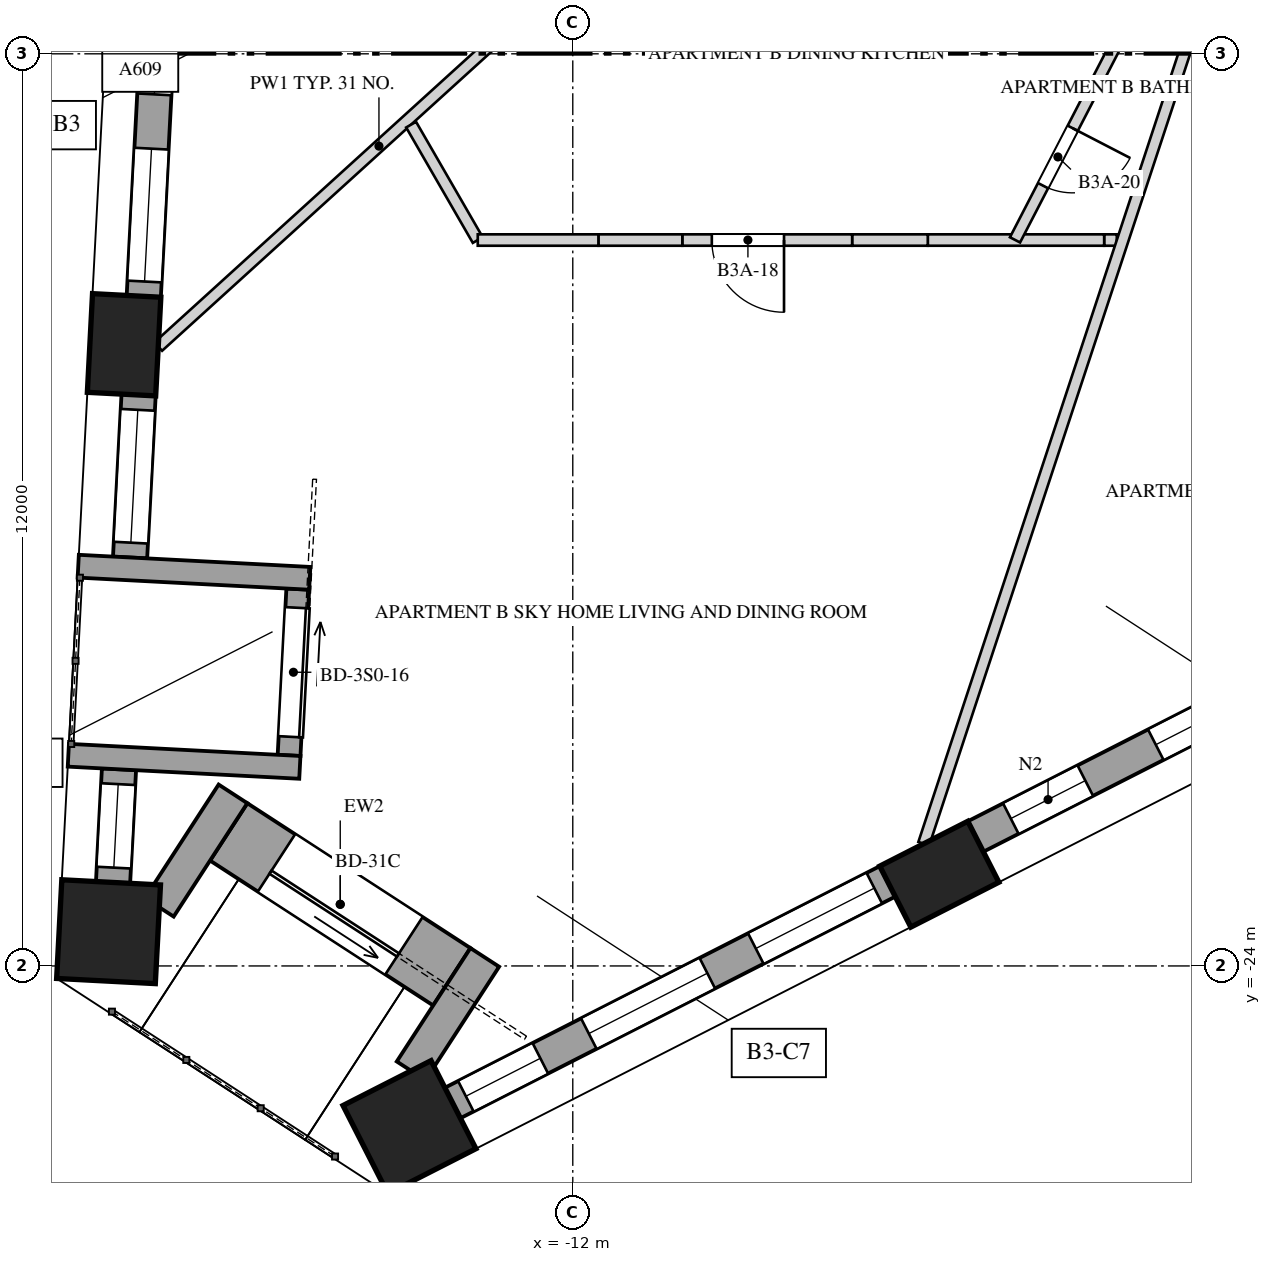
"""IFC4 building model, lengths in metres.
Left out: names, types, materials, properties, quantities, classifications, styles, units other than length and angle.
Written with IfcOpenShell. Run it as: python <this file> out.ifc"""

import sys

from ifc_helpers import new_model, si_unit, direction, frame, frame_2d, origin, origin_2d, place, context, subcontext, project, spatial, rectangle, extrude, element, fill, save


model = new_model("IFC4")
c1 = context("Model", 3, precision=1e-05, world=origin(), true_north=direction((0.0, 1.0)))
c2 = subcontext(c1, "Body", "Model", "MODEL_VIEW")
j1 = project(units=[si_unit("LENGTHUNIT", "METRE"), si_unit("PLANEANGLEUNIT", "RADIAN")], contexts=[c1])
p1 = place(None, origin())
s1 = spatial("IfcSite", under=j1, at=p1, CompositionType="ELEMENT")
p2 = place(p1, origin())
s2 = spatial("IfcBuilding", under=s1, at=p2, CompositionType="ELEMENT")
p3 = place(p2, frame((0.0, 0.0, 129.6)))
s3 = spatial("IfcBuildingStorey", under=s2, at=p3, CompositionType="ELEMENT", Elevation=129.6)
p4 = place(p3, frame((-17.903, -15.828, 0.0), z_axis=(0.0, 0.0, 1.0), x_axis=(-0.052335956243, -0.998629534755, 0.0)))
e1 = element("IfcColumn", 1, at=p4, inside=s3, PredefinedType="COLUMN", context=c2, shape_type="SweptSolid", body=[
    extrude(rectangle(XDim=1.3, YDim=0.9, at=origin_2d()), origin(), (0.0, 0.0, 1.0), 4.0),
])
for number, where, z_axis, x_axis in (
    (2, (-18.107, -23.549, 0.0), (0.0, 0.0, 1.0), (-0.052, -0.999, 0.0)),
    (3, (-14.148, -26.12, 0.0), (0.0, 0.0, 1.0), (0.891, 0.454, 0.0)),
):
    element("IfcColumn", number, at=place(p3, frame(where, z_axis=z_axis, x_axis=x_axis)), inside=s3, PredefinedType="COLUMN", context=c2, shape_type="SweptSolid", body=[
        extrude(rectangle(XDim=1.3, YDim=1.3, at=origin_2d()), origin(), (0.0, 0.0, 1.0), 4.0),
    ])
p5 = place(p3, frame((-7.178, -22.793, 0.0), z_axis=(0.0, 0.0, 1.0), x_axis=(0.891006524188, 0.45399049974, 0.0)))
e4 = element("IfcColumn", 4, at=p5, inside=s3, PredefinedType="COLUMN", context=c2, shape_type="SweptSolid", body=[
    extrude(rectangle(XDim=1.3, YDim=0.9, at=origin_2d()), origin(), (0.0, 0.0, 1.0), 4.0),
])
p6 = place(p3, frame((-17.274, -8.129, 0.0), z_axis=(0.0, 0.0, 1.0), x_axis=(-0.052339570873, -0.998629345313, 0.0)))
e5 = element("IfcWall", 5, at=p6, inside=s3, PredefinedType="SOLIDWALL", context=c2, shape_type="SweptSolid", body=[
    extrude(rectangle(XDim=7.072, YDim=0.45, at=frame_2d((3.536, 0.0))), origin(), (0.0, 0.0, 1.0), 3.3),
])
p7 = place(p6, frame((0.195, 0.0, 0.5)))
e6 = element("IfcOpeningElement", 6, at=p7, cuts=e5, PredefinedType="OPENING", context=c2, shape_type="SweptSolid", body=[
    extrude(rectangle(XDim=1.75, YDim=2.65, at=frame_2d((0.875, 1.325))), frame((0.0, 0.235, 0.0), z_axis=(0.0, -1.0, 0.0), x_axis=(1.0, 0.0, 0.0)), (0.0, 0.0, 1.0), 0.47),
])
p8 = place(p6, frame((2.661, 0.0, 0.5)))
e7 = element("IfcOpeningElement", 7, at=p8, cuts=e5, PredefinedType="OPENING", context=c2, shape_type="SweptSolid", body=[
    extrude(rectangle(XDim=1.75, YDim=2.65, at=frame_2d((0.875, 1.325))), frame((0.0, 0.235, 0.0), z_axis=(0.0, -1.0, 0.0), x_axis=(1.0, 0.0, 0.0)), (0.0, 0.0, 1.0), 0.47),
])
p9 = place(p6, frame((5.126, 0.0, 0.5)))
e8 = element("IfcOpeningElement", 8, at=p9, cuts=e5, PredefinedType="OPENING", context=c2, shape_type="SweptSolid", body=[
    extrude(rectangle(XDim=1.75, YDim=2.0, at=frame_2d((0.875, 1.0))), frame((0.0, 0.235, 0.0), z_axis=(0.0, -1.0, 0.0), x_axis=(1.0, 0.0, 0.0)), (0.0, 0.0, 1.0), 0.47),
])
p10 = place(p3, frame((-17.712, -16.489, 0.0), z_axis=(0.0, 0.0, 1.0), x_axis=(-0.05234931875, -0.998628834366, 0.0)))
e9 = element("IfcWall", 9, at=p10, inside=s3, PredefinedType="SOLIDWALL", context=c2, shape_type="SweptSolid", body=[
    extrude(rectangle(XDim=2.141, YDim=0.45, at=frame_2d((1.07, 0.0))), origin(), (0.0, 0.0, 1.0), 3.3),
])
p11 = place(p10, frame((0.195, 0.0, 0.5)))
e10 = element("IfcOpeningElement", 10, at=p11, cuts=e9, PredefinedType="OPENING", context=c2, shape_type="SweptSolid", body=[
    extrude(rectangle(XDim=1.75, YDim=2.65, at=frame_2d((0.875, 1.325))), frame((0.0, 0.235, 0.0), z_axis=(0.0, -1.0, 0.0), x_axis=(1.0, 0.0, 0.0)), (0.0, 0.0, 1.0), 0.47),
])
p12 = place(p3, frame((-17.97, -21.413, 0.0), z_axis=(0.0, 0.0, 1.0), x_axis=(-0.052412688754, -0.998625510418, 0.0)))
e11 = element("IfcWall", 11, at=p12, inside=s3, PredefinedType="SOLIDWALL", context=c2, shape_type="SweptSolid", body=[
    extrude(rectangle(XDim=1.49, YDim=0.45, at=frame_2d((0.745, 0.0))), origin(), (0.0, 0.0, 1.0), 3.3),
])
p13 = place(p12, frame((0.195, 0.0, 0.5)))
e12 = element("IfcOpeningElement", 12, at=p13, cuts=e11, PredefinedType="OPENING", context=c2, shape_type="SweptSolid", body=[
    extrude(rectangle(XDim=1.1, YDim=2.0, at=frame_2d((0.55, 1.0))), frame((0.0, 0.235, 0.0), z_axis=(0.0, -1.0, 0.0), x_axis=(1.0, 0.0, 0.0)), (0.0, 0.0, 1.0), 0.47),
])
p14 = place(p3, frame((-13.581, -25.803, 0.0), z_axis=(0.0, 0.0, 1.0), x_axis=(0.891010191031, 0.453983303085, 0.0)))
e13 = element("IfcWall", 13, at=p14, inside=s3, PredefinedType="SOLIDWALL", context=c2, shape_type="SweptSolid", body=[
    extrude(rectangle(XDim=6.422, YDim=0.45, at=frame_2d((3.211, 0.0))), origin(), (0.0, 0.0, 1.0), 3.3),
])
p15 = place(p14, frame((0.195, 0.0, 0.5)))
e14 = element("IfcOpeningElement", 14, at=p15, cuts=e13, PredefinedType="OPENING", context=c2, shape_type="SweptSolid", body=[
    extrude(rectangle(XDim=1.1, YDim=2.0, at=frame_2d((0.55, 1.0))), frame((0.0, 0.235, 0.0), z_axis=(0.0, -1.0, 0.0), x_axis=(1.0, 0.0, 0.0)), (0.0, 0.0, 1.0), 0.47),
])
p16 = place(p14, frame((2.011, 0.0, 0.5)))
e15 = element("IfcOpeningElement", 15, at=p16, cuts=e13, PredefinedType="OPENING", context=c2, shape_type="SweptSolid", body=[
    extrude(rectangle(XDim=1.75, YDim=2.65, at=frame_2d((0.875, 1.325))), frame((0.0, 0.235, 0.0), z_axis=(0.0, -1.0, 0.0), x_axis=(1.0, 0.0, 0.0)), (0.0, 0.0, 1.0), 0.47),
])
p17 = place(p14, frame((4.476, 0.0, 0.5)))
e16 = element("IfcOpeningElement", 16, at=p17, cuts=e13, PredefinedType="OPENING", context=c2, shape_type="SweptSolid", body=[
    extrude(rectangle(XDim=1.75, YDim=2.65, at=frame_2d((0.875, 1.325))), frame((0.0, 0.235, 0.0), z_axis=(0.0, -1.0, 0.0), x_axis=(1.0, 0.0, 0.0)), (0.0, 0.0, 1.0), 0.47),
])
p18 = place(p3, frame((-6.701, -22.297, 0.0), z_axis=(0.0, 0.0, 1.0), x_axis=(0.891004189171, 0.45399508244, 0.0)))
e17 = element("IfcWall", 17, at=p18, inside=s3, PredefinedType="SOLIDWALL", context=c2, shape_type="SweptSolid", body=[
    extrude(rectangle(XDim=7.072, YDim=0.45, at=frame_2d((3.536, 0.0))), origin(), (0.0, 0.0, 1.0), 3.3),
])
p19 = place(p18, frame((0.52, 0.0, 0.5)))
e18 = element("IfcOpeningElement", 18, at=p19, cuts=e17, PredefinedType="OPENING", context=c2, shape_type="SweptSolid", body=[
    extrude(rectangle(XDim=1.1, YDim=2.65, at=frame_2d((0.55, 1.325))), frame((0.0, 0.235, 0.0), z_axis=(0.0, -1.0, 0.0), x_axis=(1.0, 0.0, 0.0)), (0.0, 0.0, 1.0), 0.47),
])
p20 = place(p18, frame((2.661, 0.0, 0.5)))
e19 = element("IfcOpeningElement", 19, at=p20, cuts=e17, PredefinedType="OPENING", context=c2, shape_type="SweptSolid", body=[
    extrude(rectangle(XDim=1.75, YDim=2.65, at=frame_2d((0.875, 1.325))), frame((0.0, 0.235, 0.0), z_axis=(0.0, -1.0, 0.0), x_axis=(1.0, 0.0, 0.0)), (0.0, 0.0, 1.0), 0.47),
])
p21 = place(p18, frame((5.126, 0.0, 0.5)))
e20 = element("IfcOpeningElement", 20, at=p21, cuts=e17, PredefinedType="OPENING", context=c2, shape_type="SweptSolid", body=[
    extrude(rectangle(XDim=1.75, YDim=2.65, at=frame_2d((0.875, 1.325))), frame((0.0, 0.235, 0.0), z_axis=(0.0, -1.0, 0.0), x_axis=(1.0, 0.0, 0.0)), (0.0, 0.0, 1.0), 0.47),
])
p22 = place(p3, frame((-15.618, -19.042, 0.0), z_axis=(0.0, 0.0, 1.0), x_axis=(-0.052383338583, -0.998627050424, 0.0)))
e21 = element("IfcWall", 21, at=p22, inside=s3, PredefinedType="SOLIDWALL", context=c2, shape_type="SweptSolid", body=[
    extrude(rectangle(XDim=2.19, YDim=0.3, at=frame_2d((1.095, 0.0))), origin(), (0.0, 0.0, 1.0), 3.3),
])
p23 = place(p22, frame((0.245, 0.0, 0.0)))
e22 = element("IfcOpeningElement", 22, at=p23, cuts=e21, PredefinedType="OPENING", context=c2, shape_type="SweptSolid", body=[
    extrude(rectangle(XDim=1.7, YDim=2.45, at=frame_2d((0.85, 1.225))), frame((0.0, 0.16, 0.0), z_axis=(0.0, -1.0, 0.0), x_axis=(1.0, 0.0, 0.0)), (0.0, 0.0, 1.0), 0.32),
])
for number, where, z_axis, x_axis in (
    (23, (-18.506, -18.741, 0.0), (0.0, 0.0, 1.0), (0.999, -0.052, 0.0)),
    (24, (-18.636, -21.228, 0.0), (0.0, 0.0, 1.0), (0.999, -0.052, 0.0)),
):
    element("IfcWall", number, at=place(p3, frame(where, z_axis=z_axis, x_axis=x_axis)), inside=s3, PredefinedType="SOLIDWALL", context=c2, shape_type="SweptSolid", body=[
        extrude(rectangle(XDim=3.05, YDim=0.3, at=frame_2d((1.525, 0.0))), origin(), (0.0, 0.0, 1.0), 3.3),
    ])
p24 = place(p3, frame((-13.592, -24.142, 0.0), z_axis=(0.0, 0.0, 1.0), x_axis=(-0.838665071449, 0.544647498784, 0.0)))
e25 = element("IfcWall", 25, at=p24, inside=s3, PredefinedType="SOLIDWALL", context=c2, shape_type="SweptSolid", body=[
    extrude(rectangle(XDim=3.5, YDim=0.9, at=frame_2d((1.75, 0.0))), origin(), (0.0, 0.0, 1.0), 3.3),
])
p25 = place(p24, frame((0.75, 0.0, 0.0)))
e26 = element("IfcOpeningElement", 26, at=p25, cuts=e25, PredefinedType="OPENING", context=c2, shape_type="SweptSolid", body=[
    extrude(rectangle(XDim=2.0, YDim=2.4, at=frame_2d((1.0, 1.2))), frame((0.0, 0.46, 0.0), z_axis=(0.0, -1.0, 0.0), x_axis=(1.0, 0.0, 0.0)), (0.0, 0.0, 1.0), 0.92),
])
for number, where, z_axis, x_axis in (
    (27, (-14.127, -25.38, 0.0), (0.0, 0.0, 1.0), (0.545, 0.839, 0.0)),
    (28, (-17.44, -23.228, 0.0), (0.0, 0.0, 1.0), (0.545, 0.839, 0.0)),
):
    element("IfcWall", number, at=place(p3, frame(where, z_axis=z_axis, x_axis=x_axis)), inside=s3, PredefinedType="SOLIDWALL", context=c2, shape_type="SweptSolid", body=[
        extrude(rectangle(XDim=1.779, YDim=0.45, at=frame_2d((0.89, 0.0))), origin(), (0.0, 0.0, 1.0), 2.55),
    ])
p26 = place(p3, frame((-17.454, -15.851, 0.0), z_axis=(0.0, 0.0, 1.0), x_axis=(0.740276567096, 0.672302464824, 0.0)))
e29 = element("IfcWall", 29, at=p26, inside=s3, PredefinedType="PARTITIONING", context=c2, shape_type="SweptSolid", body=[
    extrude(rectangle(XDim=7.844, YDim=0.15, at=frame_2d((3.922, 0.0))), origin(), (0.0, 0.0, 1.0), 2.75),
])
p27 = place(p3, frame((-13.25, -14.45, 0.0), z_axis=(0.0, 0.0, 1.0), x_axis=(-0.500047902311, 0.865997745606, 0.0)))
e30 = element("IfcWall", 30, at=p27, inside=s3, PredefinedType="PARTITIONING", context=c2, shape_type="SweptSolid", body=[
    extrude(rectangle(XDim=1.753, YDim=0.15, at=frame_2d((0.876, 0.0))), origin(), (0.0, 0.0, 1.0), 3.65),
])
p28 = place(p3, frame((-4.843, -14.45, 0.0), z_axis=(0.0, 0.0, 1.0), x_axis=(-1.0, 0.0, 0.0)))
e31 = element("IfcWall", 31, at=p28, inside=s3, PredefinedType="PARTITIONING", context=c2, shape_type="SweptSolid", body=[
    extrude(rectangle(XDim=0.166, YDim=0.15, at=frame_2d((0.083, 0.0))), origin(), (0.0, 0.0, 1.0), 2.55),
])
p29 = place(p3, frame((-5.009, -14.45, 0.0), z_axis=(0.0, 0.0, 1.0), x_axis=(-1.0, 0.0, 0.0)))
e32 = element("IfcWall", 32, at=p29, inside=s3, PredefinedType="PARTITIONING", context=c2, shape_type="SweptSolid", body=[
    extrude(rectangle(XDim=2.321, YDim=0.15, at=frame_2d((1.16, 0.0))), origin(), (0.0, 0.0, 1.0), 3.65),
])
p30 = place(p3, frame((-7.33, -14.45, 0.0), z_axis=(0.0, 0.0, 1.0), x_axis=(-1.0, 0.0, 0.0)))
e33 = element("IfcWall", 33, at=p30, inside=s3, PredefinedType="PARTITIONING", context=c2, shape_type="SweptSolid", body=[
    extrude(rectangle(XDim=0.995, YDim=0.15, at=frame_2d((0.498, 0.0))), origin(), (0.0, 0.0, 1.0), 2.55),
])
p31 = place(p3, frame((-8.325, -14.45, 0.0), z_axis=(0.0, 0.0, 1.0), x_axis=(-1.0, 0.0, 0.0)))
e34 = element("IfcWall", 34, at=p31, inside=s3, PredefinedType="PARTITIONING", context=c2, shape_type="SweptSolid", body=[
    extrude(rectangle(XDim=2.234, YDim=0.15, at=frame_2d((1.117, 0.0))), origin(), (0.0, 0.0, 1.0), 3.65),
])
p32 = place(p31, frame((0.896, 0.0, 0.0)))
e35 = element("IfcOpeningElement", 35, at=p32, cuts=e34, PredefinedType="OPENING", context=c2, shape_type="SweptSolid", body=[
    extrude(rectangle(XDim=0.95, YDim=2.4, at=frame_2d((0.475, 1.2))), frame((0.0, 0.085, 0.0), z_axis=(0.0, -1.0, 0.0), x_axis=(1.0, 0.0, 0.0)), (0.0, 0.0, 1.0), 0.17),
])
p33 = place(p3, frame((-10.559, -14.45, 0.0), z_axis=(0.0, 0.0, 1.0), x_axis=(-1.0, 0.0, 0.0)))
e36 = element("IfcWall", 36, at=p33, inside=s3, PredefinedType="PARTITIONING", context=c2, shape_type="SweptSolid", body=[
    extrude(rectangle(XDim=1.104, YDim=0.15, at=frame_2d((0.552, 0.0))), origin(), (0.0, 0.0, 1.0), 2.55),
])
p34 = place(p3, frame((-11.663, -14.45, 0.0), z_axis=(0.0, 0.0, 1.0), x_axis=(-1.0, 0.0, 0.0)))
e37 = element("IfcWall", 37, at=p34, inside=s3, PredefinedType="PARTITIONING", context=c2, shape_type="SweptSolid", body=[
    extrude(rectangle(XDim=1.587, YDim=0.15, at=frame_2d((0.794, 0.0))), origin(), (0.0, 0.0, 1.0), 3.65),
])
p35 = place(p3, frame((-4.425, -11.052, 0.0), z_axis=(0.0, 0.0, 1.0), x_axis=(-0.459481978347, -0.888187092664, 0.0)))
e38 = element("IfcWall", 38, at=p35, inside=s3, PredefinedType="PARTITIONING", context=c2, shape_type="SweptSolid", body=[
    extrude(rectangle(XDim=3.823, YDim=0.15, at=frame_2d((1.912, 0.0))), origin(), (0.0, 0.0, 1.0), 3.65),
])
p36 = place(p35, frame((2.17, 0.0, 0.0)))
e39 = element("IfcOpeningElement", 39, at=p36, cuts=e38, PredefinedType="OPENING", context=c2, shape_type="SweptSolid", body=[
    extrude(rectangle(XDim=0.85, YDim=2.4, at=frame_2d((0.425, 1.2))), frame((0.0, 0.085, 0.0), z_axis=(0.0, -1.0, 0.0), x_axis=(1.0, 0.0, 0.0)), (0.0, 0.0, 1.0), 0.17),
])
p37 = place(p3, frame((-3.668, -11.125, 0.0), z_axis=(0.0, 0.0, 1.0), x_axis=(-0.313095908813, -0.949721512805, 0.0)))
e40 = element("IfcWall", 40, at=p37, inside=s3, PredefinedType="PARTITIONING", context=c2, shape_type="SweptSolid", body=[
    extrude(rectangle(XDim=11.863, YDim=0.15, at=frame_2d((5.932, 0.0))), origin(), (0.0, 0.0, 1.0), 2.55),
])
p38 = place(p8, origin())
e41 = element("IfcWindow", 41, at=p38, inside=s3, PartitioningType="SINGLE_PANEL", PredefinedType="WINDOW", context=c2, shape_type="SweptSolid", body=[
    extrude(rectangle(XDim=1.75, YDim=2.65, at=frame_2d((0.875, 1.325))), frame((0.0, 0.03, 0.0), z_axis=(0.0, -1.0, 0.0), x_axis=(1.0, 0.0, 0.0)), (0.0, 0.0, 1.0), 0.06),
])
fill(e7, e41)
p39 = place(p9, origin())
e42 = element("IfcWindow", 42, at=p39, inside=s3, PartitioningType="SINGLE_PANEL", PredefinedType="WINDOW", context=c2, shape_type="SweptSolid", body=[
    extrude(rectangle(XDim=1.75, YDim=2.0, at=frame_2d((0.875, 1.0))), frame((0.0, 0.03, 0.0), z_axis=(0.0, -1.0, 0.0), x_axis=(1.0, 0.0, 0.0)), (0.0, 0.0, 1.0), 0.06),
])
fill(e8, e42)
p40 = place(p11, origin())
e43 = element("IfcWindow", 43, at=p40, inside=s3, PartitioningType="SINGLE_PANEL", PredefinedType="WINDOW", context=c2, shape_type="SweptSolid", body=[
    extrude(rectangle(XDim=1.75, YDim=2.65, at=frame_2d((0.875, 1.325))), frame((0.0, 0.03, 0.0), z_axis=(0.0, -1.0, 0.0), x_axis=(1.0, 0.0, 0.0)), (0.0, 0.0, 1.0), 0.06),
])
fill(e10, e43)
p41 = place(p13, origin())
e44 = element("IfcWindow", 44, at=p41, inside=s3, PartitioningType="SINGLE_PANEL", PredefinedType="WINDOW", context=c2, shape_type="SweptSolid", body=[
    extrude(rectangle(XDim=1.1, YDim=2.0, at=frame_2d((0.55, 1.0))), frame((0.0, 0.03, 0.0), z_axis=(0.0, -1.0, 0.0), x_axis=(1.0, 0.0, 0.0)), (0.0, 0.0, 1.0), 0.06),
])
fill(e12, e44)
p42 = place(p15, origin())
e45 = element("IfcWindow", 45, at=p42, inside=s3, PartitioningType="SINGLE_PANEL", PredefinedType="WINDOW", context=c2, shape_type="SweptSolid", body=[
    extrude(rectangle(XDim=1.1, YDim=2.0, at=frame_2d((0.55, 1.0))), frame((0.0, 0.03, 0.0), z_axis=(0.0, -1.0, 0.0), x_axis=(1.0, 0.0, 0.0)), (0.0, 0.0, 1.0), 0.06),
])
fill(e14, e45)
p43 = place(p16, origin())
e46 = element("IfcWindow", 46, at=p43, inside=s3, PartitioningType="SINGLE_PANEL", PredefinedType="WINDOW", context=c2, shape_type="SweptSolid", body=[
    extrude(rectangle(XDim=1.75, YDim=2.65, at=frame_2d((0.875, 1.325))), frame((0.0, 0.03, 0.0), z_axis=(0.0, -1.0, 0.0), x_axis=(1.0, 0.0, 0.0)), (0.0, 0.0, 1.0), 0.06),
])
fill(e15, e46)
p44 = place(p17, origin())
e47 = element("IfcWindow", 47, at=p44, inside=s3, PartitioningType="SINGLE_PANEL", PredefinedType="WINDOW", context=c2, shape_type="SweptSolid", body=[
    extrude(rectangle(XDim=1.75, YDim=2.65, at=frame_2d((0.875, 1.325))), frame((0.0, 0.03, 0.0), z_axis=(0.0, -1.0, 0.0), x_axis=(1.0, 0.0, 0.0)), (0.0, 0.0, 1.0), 0.06),
])
fill(e16, e47)
p45 = place(p19, origin())
e48 = element("IfcWindow", 48, at=p45, inside=s3, PartitioningType="SINGLE_PANEL", PredefinedType="WINDOW", context=c2, shape_type="SweptSolid", body=[
    extrude(rectangle(XDim=1.1, YDim=2.65, at=frame_2d((0.55, 1.325))), frame((0.0, 0.03, 0.0), z_axis=(0.0, -1.0, 0.0), x_axis=(1.0, 0.0, 0.0)), (0.0, 0.0, 1.0), 0.06),
])
fill(e18, e48)
p46 = place(p20, origin())
e49 = element("IfcWindow", 49, at=p46, inside=s3, PartitioningType="SINGLE_PANEL", PredefinedType="WINDOW", context=c2, shape_type="SweptSolid", body=[
    extrude(rectangle(XDim=1.75, YDim=2.65, at=frame_2d((0.875, 1.325))), frame((0.0, 0.03, 0.0), z_axis=(0.0, -1.0, 0.0), x_axis=(1.0, 0.0, 0.0)), (0.0, 0.0, 1.0), 0.06),
])
fill(e19, e49)
p47 = place(p23, origin())
e50 = element("IfcDoor", 50, at=p47, inside=s3, OperationType="SLIDING_TO_LEFT", PredefinedType="DOOR", context=c2, shape_type="SweptSolid", body=[
    extrude(rectangle(XDim=1.7, YDim=2.45, at=frame_2d((0.85, 1.225))), frame((0.0, 0.025, 0.0), z_axis=(0.0, -1.0, 0.0), x_axis=(1.0, 0.0, 0.0)), (0.0, 0.0, 1.0), 0.05),
])
fill(e22, e50)
p48 = place(p25, origin())
e51 = element("IfcDoor", 51, at=p48, inside=s3, OperationType="SLIDING_TO_LEFT", PredefinedType="DOOR", context=c2, shape_type="SweptSolid", body=[
    extrude(rectangle(XDim=2.0, YDim=2.4, at=frame_2d((1.0, 1.2))), frame((0.0, 0.025, 0.0), z_axis=(0.0, -1.0, 0.0), x_axis=(1.0, 0.0, 0.0)), (0.0, 0.0, 1.0), 0.05),
])
fill(e26, e51)
p49 = place(p32, origin())
e52 = element("IfcDoor", 52, at=p49, inside=s3, OperationType="SINGLE_SWING_RIGHT", PredefinedType="DOOR", context=c2, shape_type="SweptSolid", body=[
    extrude(rectangle(XDim=0.95, YDim=2.4, at=frame_2d((0.475, 1.2))), frame((0.0, 0.025, 0.0), z_axis=(0.0, -1.0, 0.0), x_axis=(1.0, 0.0, 0.0)), (0.0, 0.0, 1.0), 0.05),
])
fill(e35, e52)
p50 = place(p36, origin())
e53 = element("IfcDoor", 53, at=p50, inside=s3, OperationType="SINGLE_SWING_RIGHT", PredefinedType="DOOR", context=c2, shape_type="SweptSolid", body=[
    extrude(rectangle(XDim=0.85, YDim=2.4, at=frame_2d((0.425, 1.2))), frame((0.0, 0.025, 0.0), z_axis=(0.0, -1.0, 0.0), x_axis=(1.0, 0.0, 0.0)), (0.0, 0.0, 1.0), 0.05),
])
fill(e39, e53)
save(model, sys.argv[1])
